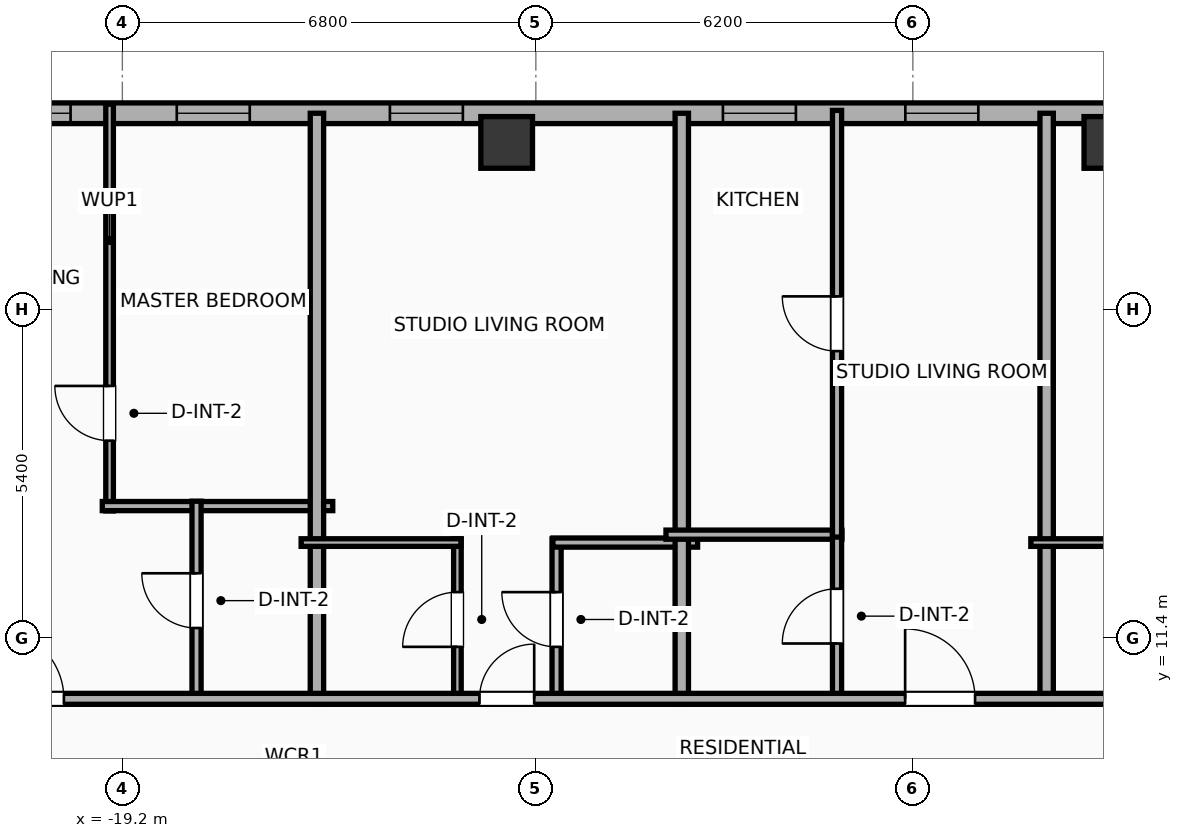
"""IFC4 building model, lengths in metres.
Left out: names, types, materials, properties, quantities, classifications, styles, units other than length and angle.
Written with IfcOpenShell. Run it as: python <this file> out.ifc"""

import sys

from ifc_helpers import new_model, si_unit, direction, frame, frame_2d, origin, origin_2d, place, context, subcontext, project, spatial, rectangle, hollow_rectangle, extrude, element, fill, save


model = new_model("IFC4")
c1 = context("Model", 3, precision=1e-05, world=origin(), true_north=direction((0.0, 1.0)))
c2 = subcontext(c1, "Body", "Model", "MODEL_VIEW")
j1 = project(units=[si_unit("LENGTHUNIT", "METRE"), si_unit("PLANEANGLEUNIT", "RADIAN")], contexts=[c1])
p1 = place(None, origin())
s1 = spatial("IfcSite", under=j1, at=p1, CompositionType="ELEMENT")
p2 = place(p1, origin())
s2 = spatial("IfcBuilding", under=s1, at=p2, CompositionType="ELEMENT")
p3 = place(p2, frame((0.0, 0.0, 208.0)))
s3 = spatial("IfcBuildingStorey", under=s2, at=p3, CompositionType="ELEMENT", Elevation=208.0)
for number, where, z_axis, x_axis in (
    (1, (-2.96, 19.55, 0.0), (0.0, 0.0, 1.0), (1.0, 0.0, 0.0)),
    (2, (-12.88, 19.55, 0.0), (0.0, 0.0, 1.0), (1.0, 0.0, 0.0)),
):
    element("IfcColumn", number, at=place(p3, frame(where, z_axis=z_axis, x_axis=x_axis)), inside=s3, PredefinedType="COLUMN", context=c2, shape_type="SweptSolid", body=[
        extrude(hollow_rectangle(XDim=0.85, YDim=0.85, WallThickness=0.028, at=origin_2d()), origin(), (0.0, 0.0, 1.0), 3.9),
    ])
p4 = place(p3, frame((-22.783, 20.03, 0.0), z_axis=(0.0, 0.0, 1.0), x_axis=(1.0, 0.0, 0.0)))
e3 = element("IfcWall", 3, at=p4, inside=s3, PredefinedType="ELEMENTEDWALL", context=c2, shape_type="SweptSolid", body=[
    extrude(rectangle(XDim=49.566, YDim=0.34, at=frame_2d((24.783, 0.0))), origin(), (0.0, 0.0, 1.0), 3.65),
])
p5 = place(p4, frame((25.233, 0.0, 0.75)))
e4 = element("IfcOpeningElement", 4, at=p5, cuts=e3, PredefinedType="OPENING", context=c2, shape_type="SweptSolid", body=[
    extrude(rectangle(XDim=2.4, YDim=2.1, at=frame_2d((1.2, 1.05))), frame((0.0, 0.18, 0.0), z_axis=(0.0, -1.0, 0.0), x_axis=(1.0, 0.0, 0.0)), (0.0, 0.0, 1.0), 0.36),
])
p6 = place(p4, frame((1.532, 0.0, 0.75)))
e5 = element("IfcOpeningElement", 5, at=p6, cuts=e3, PredefinedType="OPENING", context=c2, shape_type="SweptSolid", body=[
    extrude(rectangle(XDim=1.2, YDim=2.05, at=frame_2d((0.6, 1.025))), frame((0.0, 0.18, 0.0), z_axis=(0.0, -1.0, 0.0), x_axis=(1.0, 0.0, 0.0)), (0.0, 0.0, 1.0), 0.36),
])
p7 = place(p4, frame((4.478, 0.0, 0.75)))
e6 = element("IfcOpeningElement", 6, at=p7, cuts=e3, PredefinedType="OPENING", context=c2, shape_type="SweptSolid", body=[
    extrude(rectangle(XDim=1.2, YDim=2.05, at=frame_2d((0.6, 1.025))), frame((0.0, 0.18, 0.0), z_axis=(0.0, -1.0, 0.0), x_axis=(1.0, 0.0, 0.0)), (0.0, 0.0, 1.0), 0.36),
])
p8 = place(p4, frame((7.983, 0.0, 0.75)))
e7 = element("IfcOpeningElement", 7, at=p8, cuts=e3, PredefinedType="OPENING", context=c2, shape_type="SweptSolid", body=[
    extrude(rectangle(XDim=1.2, YDim=2.05, at=frame_2d((0.6, 1.025))), frame((0.0, 0.18, 0.0), z_axis=(0.0, -1.0, 0.0), x_axis=(1.0, 0.0, 0.0)), (0.0, 0.0, 1.0), 0.36),
])
p9 = place(p4, frame((16.46, 0.0, 0.75)))
e8 = element("IfcOpeningElement", 8, at=p9, cuts=e3, PredefinedType="OPENING", context=c2, shape_type="SweptSolid", body=[
    extrude(rectangle(XDim=1.2, YDim=2.05, at=frame_2d((0.6, 1.025))), frame((0.0, 0.18, 0.0), z_axis=(0.0, -1.0, 0.0), x_axis=(1.0, 0.0, 0.0)), (0.0, 0.0, 1.0), 0.36),
])
p10 = place(p4, frame((13.46, 0.0, 0.75)))
e9 = element("IfcOpeningElement", 9, at=p10, cuts=e3, PredefinedType="OPENING", context=c2, shape_type="SweptSolid", body=[
    extrude(rectangle(XDim=1.2, YDim=2.05, at=frame_2d((0.6, 1.025))), frame((0.0, 0.18, 0.0), z_axis=(0.0, -1.0, 0.0), x_axis=(1.0, 0.0, 0.0)), (0.0, 0.0, 1.0), 0.36),
])
p11 = place(p4, frame((21.183, 0.0, 0.75)))
e10 = element("IfcOpeningElement", 10, at=p11, cuts=e3, PredefinedType="OPENING", context=c2, shape_type="SweptSolid", body=[
    extrude(rectangle(XDim=1.2, YDim=2.05, at=frame_2d((0.6, 1.025))), frame((0.0, 0.18, 0.0), z_axis=(0.0, -1.0, 0.0), x_axis=(1.0, 0.0, 0.0)), (0.0, 0.0, 1.0), 0.36),
])
p12 = place(p4, frame((31.808, 0.0, 0.75)))
e11 = element("IfcOpeningElement", 11, at=p12, cuts=e3, PredefinedType="OPENING", context=c2, shape_type="SweptSolid", body=[
    extrude(rectangle(XDim=1.2, YDim=2.05, at=frame_2d((0.6, 1.025))), frame((0.0, 0.18, 0.0), z_axis=(0.0, -1.0, 0.0), x_axis=(1.0, 0.0, 0.0)), (0.0, 0.0, 1.0), 0.36),
])
p13 = place(p4, frame((34.558, 0.0, 0.75)))
e12 = element("IfcOpeningElement", 12, at=p13, cuts=e3, PredefinedType="OPENING", context=c2, shape_type="SweptSolid", body=[
    extrude(rectangle(XDim=1.2, YDim=2.05, at=frame_2d((0.6, 1.025))), frame((0.0, 0.18, 0.0), z_axis=(0.0, -1.0, 0.0), x_axis=(1.0, 0.0, 0.0)), (0.0, 0.0, 1.0), 0.36),
])
p14 = place(p4, frame((37.833, 0.0, 0.75)))
e13 = element("IfcOpeningElement", 13, at=p14, cuts=e3, PredefinedType="OPENING", context=c2, shape_type="SweptSolid", body=[
    extrude(rectangle(XDim=1.2, YDim=2.05, at=frame_2d((0.6, 1.025))), frame((0.0, 0.18, 0.0), z_axis=(0.0, -1.0, 0.0), x_axis=(1.0, 0.0, 0.0)), (0.0, 0.0, 1.0), 0.36),
])
p15 = place(p4, frame((42.797, 0.0, 0.75)))
e14 = element("IfcOpeningElement", 14, at=p15, cuts=e3, PredefinedType="OPENING", context=c2, shape_type="SweptSolid", body=[
    extrude(rectangle(XDim=1.2, YDim=2.05, at=frame_2d((0.6, 1.025))), frame((0.0, 0.18, 0.0), z_axis=(0.0, -1.0, 0.0), x_axis=(1.0, 0.0, 0.0)), (0.0, 0.0, 1.0), 0.36),
])
p16 = place(p4, frame((45.606, 0.0, 0.75)))
e15 = element("IfcOpeningElement", 15, at=p16, cuts=e3, PredefinedType="OPENING", context=c2, shape_type="SweptSolid", body=[
    extrude(rectangle(XDim=1.2, YDim=2.05, at=frame_2d((0.6, 1.025))), frame((0.0, 0.18, 0.0), z_axis=(0.0, -1.0, 0.0), x_axis=(1.0, 0.0, 0.0)), (0.0, 0.0, 1.0), 0.36),
])
p17 = place(p4, frame((47.679, 0.0, 0.75)))
e16 = element("IfcOpeningElement", 16, at=p17, cuts=e3, PredefinedType="OPENING", context=c2, shape_type="SweptSolid", body=[
    extrude(rectangle(XDim=1.2, YDim=2.05, at=frame_2d((0.6, 1.025))), frame((0.0, 0.18, 0.0), z_axis=(0.0, -1.0, 0.0), x_axis=(1.0, 0.0, 0.0)), (0.0, 0.0, 1.0), 0.36),
])
p18 = place(p3, frame((-19.41, 13.49, 0.0), z_axis=(0.0, 0.0, 1.0), x_axis=(0.0, 1.0, 0.0)))
e17 = element("IfcWall", 17, at=p18, inside=s3, PredefinedType="PARTITIONING", context=c2, shape_type="SweptSolid", body=[
    extrude(rectangle(XDim=6.69, YDim=0.125, at=frame_2d((3.345, 0.0))), origin(), (0.0, 0.0, 1.0), 3.65),
])
p19 = place(p18, frame((1.156, 0.0, 0.0)))
e18 = element("IfcOpeningElement", 18, at=p19, cuts=e17, PredefinedType="OPENING", context=c2, shape_type="SweptSolid", body=[
    extrude(rectangle(XDim=0.9, YDim=2.05, at=frame_2d((0.45, 1.025))), frame((0.0, 0.073, 0.0), z_axis=(0.0, -1.0, 0.0), x_axis=(1.0, 0.0, 0.0)), (0.0, 0.0, 1.0), 0.145),
])
p20 = place(p3, frame((-19.53, 13.57, 0.0), z_axis=(0.0, 0.0, 1.0), x_axis=(1.0, 0.0, 0.0)))
e19 = element("IfcWall", 19, at=p20, inside=s3, PredefinedType="PLUMBINGWALL", context=c2, shape_type="SweptSolid", body=[
    extrude(rectangle(XDim=3.79, YDim=0.15, at=frame_2d((1.895, 0.0))), origin(), (0.0, 0.0, 1.0), 3.65),
])
p21 = place(p3, frame((-17.98, 10.38, 0.0), z_axis=(0.0, 0.0, 1.0), x_axis=(0.0, 1.0, 0.0)))
e20 = element("IfcWall", 20, at=p21, inside=s3, PredefinedType="PLUMBINGWALL", context=c2, shape_type="SweptSolid", body=[
    extrude(rectangle(XDim=3.27, YDim=0.15, at=frame_2d((1.635, 0.0))), origin(), (0.0, 0.0, 1.0), 3.65),
])
p22 = place(p21, frame((1.185, 0.0, 0.0)))
e21 = element("IfcOpeningElement", 21, at=p22, cuts=e20, PredefinedType="OPENING", context=c2, shape_type="SweptSolid", body=[
    extrude(rectangle(XDim=0.9, YDim=2.05, at=frame_2d((0.45, 1.025))), frame((0.0, 0.085, 0.0), z_axis=(0.0, -1.0, 0.0), x_axis=(1.0, 0.0, 0.0)), (0.0, 0.0, 1.0), 0.17),
])
p23 = place(p3, frame((-16.0, 10.32, 0.0), z_axis=(0.0, 0.0, 1.0), x_axis=(0.0, 1.0, 0.0)))
e22 = element("IfcWall", 22, at=p23, inside=s3, PredefinedType="PARTITIONING", context=c2, shape_type="SweptSolid", body=[
    extrude(rectangle(XDim=9.71, YDim=0.22, at=frame_2d((4.855, 0.0))), origin(), (0.0, 0.0, 1.0), 3.65),
])
p24 = place(p3, frame((-13.69, 10.38, 0.0), z_axis=(0.0, 0.0, 1.0), x_axis=(0.0, 1.0, 0.0)))
e23 = element("IfcWall", 23, at=p24, inside=s3, PredefinedType="PARTITIONING", context=c2, shape_type="SweptSolid", body=[
    extrude(rectangle(XDim=2.65, YDim=0.125, at=frame_2d((1.325, 0.0))), origin(), (0.0, 0.0, 1.0), 3.65),
])
p25 = place(p24, frame((0.875, 0.0, 0.0)))
e24 = element("IfcOpeningElement", 24, at=p25, cuts=e23, PredefinedType="OPENING", context=c2, shape_type="SweptSolid", body=[
    extrude(rectangle(XDim=0.9, YDim=2.05, at=frame_2d((0.45, 1.025))), frame((0.0, 0.073, 0.0), z_axis=(0.0, -1.0, 0.0), x_axis=(1.0, 0.0, 0.0)), (0.0, 0.0, 1.0), 0.145),
])
p26 = place(p3, frame((-12.059, 10.38, 0.0), z_axis=(0.0, 0.0, 1.0), x_axis=(0.0, 1.0, 0.0)))
e25 = element("IfcWall", 25, at=p26, inside=s3, PredefinedType="PLUMBINGWALL", context=c2, shape_type="SweptSolid", body=[
    extrude(rectangle(XDim=2.65, YDim=0.15, at=frame_2d((1.325, 0.0))), origin(), (0.0, 0.0, 1.0), 3.65),
])
p27 = place(p26, frame((0.875, 0.0, 0.0)))
e26 = element("IfcOpeningElement", 26, at=p27, cuts=e25, PredefinedType="OPENING", context=c2, shape_type="SweptSolid", body=[
    extrude(rectangle(XDim=0.9, YDim=2.05, at=frame_2d((0.45, 1.025))), frame((0.0, 0.085, 0.0), z_axis=(0.0, -1.0, 0.0), x_axis=(1.0, 0.0, 0.0)), (0.0, 0.0, 1.0), 0.17),
])
p28 = place(p3, frame((-16.26, 12.97, 0.0), z_axis=(0.0, 0.0, 1.0), x_axis=(1.0, 0.0, 0.0)))
e27 = element("IfcWall", 27, at=p28, inside=s3, PredefinedType="PARTITIONING", context=c2, shape_type="SweptSolid", body=[
    extrude(rectangle(XDim=2.63, YDim=0.125, at=frame_2d((1.315, 0.0))), origin(), (0.0, 0.0, 1.0), 3.65),
])
p29 = place(p3, frame((-12.119, 12.97, 0.0), z_axis=(0.0, 0.0, 1.0), x_axis=(1.0, 0.0, 0.0)))
e28 = element("IfcWall", 28, at=p29, inside=s3, PredefinedType="PLUMBINGWALL", context=c2, shape_type="SweptSolid", body=[
    extrude(rectangle(XDim=2.379, YDim=0.15, at=frame_2d((1.189, 0.0))), origin(), (0.0, 0.0, 1.0), 3.65),
])
p30 = place(p3, frame((-10.0, 10.32, 0.0), z_axis=(0.0, 0.0, 1.0), x_axis=(0.0, 1.0, 0.0)))
e29 = element("IfcWall", 29, at=p30, inside=s3, PredefinedType="PARTITIONING", context=c2, shape_type="SweptSolid", body=[
    extrude(rectangle(XDim=9.71, YDim=0.22, at=frame_2d((4.855, 0.0))), origin(), (0.0, 0.0, 1.0), 3.65),
])
p31 = place(p3, frame((-10.26, 13.1, 0.0), z_axis=(0.0, 0.0, 1.0), x_axis=(1.0, 0.0, 0.0)))
e30 = element("IfcWall", 30, at=p31, inside=s3, PredefinedType="PLUMBINGWALL", context=c2, shape_type="SweptSolid", body=[
    extrude(rectangle(XDim=2.893, YDim=0.15, at=frame_2d((1.447, 0.0))), origin(), (0.0, 0.0, 1.0), 3.65),
])
p32 = place(p3, frame((-7.447, 10.38, 0.0), z_axis=(0.0, 0.0, 1.0), x_axis=(0.0, 1.0, 0.0)))
e31 = element("IfcWall", 31, at=p32, inside=s3, PredefinedType="PLUMBINGWALL", context=c2, shape_type="SweptSolid", body=[
    extrude(rectangle(XDim=2.76, YDim=0.15, at=frame_2d((1.38, 0.0))), origin(), (0.0, 0.0, 1.0), 3.65),
])
p33 = place(p32, frame((0.93, 0.0, 0.0)))
e32 = element("IfcOpeningElement", 32, at=p33, cuts=e31, PredefinedType="OPENING", context=c2, shape_type="SweptSolid", body=[
    extrude(rectangle(XDim=0.9, YDim=2.05, at=frame_2d((0.45, 1.025))), frame((0.0, 0.085, 0.0), z_axis=(0.0, -1.0, 0.0), x_axis=(1.0, 0.0, 0.0)), (0.0, 0.0, 1.0), 0.17),
])
p34 = place(p3, frame((-7.447, 13.06, 0.0), z_axis=(0.0, 0.0, 1.0), x_axis=(0.0, 1.0, 0.0)))
e33 = element("IfcWall", 33, at=p34, inside=s3, PredefinedType="PLUMBINGWALL", context=c2, shape_type="SweptSolid", body=[
    extrude(rectangle(XDim=7.017, YDim=0.15, at=frame_2d((3.508, 0.0))), origin(), (0.0, 0.0, 1.0), 3.65),
])
p35 = place(p34, frame((3.058, 0.0, 0.0)))
e34 = element("IfcOpeningElement", 34, at=p35, cuts=e33, PredefinedType="OPENING", context=c2, shape_type="SweptSolid", body=[
    extrude(rectangle(XDim=0.9, YDim=2.05, at=frame_2d((0.45, 1.025))), frame((0.0, 0.085, 0.0), z_axis=(0.0, -1.0, 0.0), x_axis=(1.0, 0.0, 0.0)), (0.0, 0.0, 1.0), 0.17),
])
p36 = place(p3, frame((-4.0, 10.32, 0.0), z_axis=(0.0, 0.0, 1.0), x_axis=(0.0, 1.0, 0.0)))
e35 = element("IfcWall", 35, at=p36, inside=s3, PredefinedType="PARTITIONING", context=c2, shape_type="SweptSolid", body=[
    extrude(rectangle(XDim=9.71, YDim=0.22, at=frame_2d((4.855, 0.0))), origin(), (0.0, 0.0, 1.0), 3.09),
])
p37 = place(p3, frame((-4.26, 12.97, 0.0), z_axis=(0.0, 0.0, 1.0), x_axis=(1.0, 0.0, 0.0)))
e36 = element("IfcWall", 36, at=p37, inside=s3, PredefinedType="PARTITIONING", context=c2, shape_type="SweptSolid", body=[
    extrude(rectangle(XDim=2.63, YDim=0.125, at=frame_2d((1.315, 0.0))), origin(), (0.0, 0.0, 1.0), 3.65),
])
p38 = place(p3, frame((-26.23, 10.4, 0.0), z_axis=(0.0, 0.0, 1.0), x_axis=(1.0, 0.0, 0.0)))
e37 = element("IfcWall", 37, at=p38, inside=s3, PredefinedType="PARTITIONING", context=c2, shape_type="SweptSolid", body=[
    extrude(rectangle(XDim=56.46, YDim=0.18, at=frame_2d((28.23, 0.0))), origin(), (0.0, 0.0, 1.0), 3.65),
])
p39 = place(p38, frame((4.919, 0.0, 0.0)))
e38 = element("IfcOpeningElement", 38, at=p39, cuts=e37, PredefinedType="OPENING", context=c2, shape_type="SweptSolid", body=[
    extrude(rectangle(XDim=1.15, YDim=2.05, at=frame_2d((0.575, 1.025))), frame((0.0, 0.1, 0.0), z_axis=(0.0, -1.0, 0.0), x_axis=(1.0, 0.0, 0.0)), (0.0, 0.0, 1.0), 0.2),
])
p40 = place(p38, frame((12.903, 0.0, 0.0)))
e39 = element("IfcOpeningElement", 39, at=p40, cuts=e37, PredefinedType="OPENING", context=c2, shape_type="SweptSolid", body=[
    extrude(rectangle(XDim=0.9, YDim=2.05, at=frame_2d((0.45, 1.025))), frame((0.0, 0.1, 0.0), z_axis=(0.0, -1.0, 0.0), x_axis=(1.0, 0.0, 0.0)), (0.0, 0.0, 1.0), 0.2),
])
p41 = place(p38, frame((19.903, 0.0, 0.0)))
e40 = element("IfcOpeningElement", 40, at=p41, cuts=e37, PredefinedType="OPENING", context=c2, shape_type="SweptSolid", body=[
    extrude(rectangle(XDim=1.15, YDim=2.05, at=frame_2d((0.575, 1.025))), frame((0.0, 0.1, 0.0), z_axis=(0.0, -1.0, 0.0), x_axis=(1.0, 0.0, 0.0)), (0.0, 0.0, 1.0), 0.2),
])
p42 = place(p38, frame((24.906, 0.0, 0.0)))
e41 = element("IfcOpeningElement", 41, at=p42, cuts=e37, PredefinedType="OPENING", context=c2, shape_type="SweptSolid", body=[
    extrude(rectangle(XDim=0.9, YDim=2.05, at=frame_2d((0.45, 1.025))), frame((0.0, 0.1, 0.0), z_axis=(0.0, -1.0, 0.0), x_axis=(1.0, 0.0, 0.0)), (0.0, 0.0, 1.0), 0.2),
])
p43 = place(p38, frame((30.908, 0.0, 0.0)))
e42 = element("IfcOpeningElement", 42, at=p43, cuts=e37, PredefinedType="OPENING", context=c2, shape_type="SweptSolid", body=[
    extrude(rectangle(XDim=0.9, YDim=2.05, at=frame_2d((0.45, 1.025))), frame((0.0, 0.1, 0.0), z_axis=(0.0, -1.0, 0.0), x_axis=(1.0, 0.0, 0.0)), (0.0, 0.0, 1.0), 0.2),
])
p44 = place(p38, frame((35.311, 0.0, 0.0)))
e43 = element("IfcOpeningElement", 43, at=p44, cuts=e37, PredefinedType="OPENING", context=c2, shape_type="SweptSolid", body=[
    extrude(rectangle(XDim=1.15, YDim=2.05, at=frame_2d((0.575, 1.025))), frame((0.0, 0.1, 0.0), z_axis=(0.0, -1.0, 0.0), x_axis=(1.0, 0.0, 0.0)), (0.0, 0.0, 1.0), 0.2),
])
p45 = place(p38, frame((42.24, 0.0, 0.0)))
e44 = element("IfcOpeningElement", 44, at=p45, cuts=e37, PredefinedType="OPENING", context=c2, shape_type="SweptSolid", body=[
    extrude(rectangle(XDim=0.9, YDim=2.05, at=frame_2d((0.45, 1.025))), frame((0.0, 0.1, 0.0), z_axis=(0.0, -1.0, 0.0), x_axis=(1.0, 0.0, 0.0)), (0.0, 0.0, 1.0), 0.2),
])
p46 = place(p38, frame((46.298, 0.0, 0.0)))
e45 = element("IfcOpeningElement", 45, at=p46, cuts=e37, PredefinedType="OPENING", context=c2, shape_type="SweptSolid", body=[
    extrude(rectangle(XDim=1.15, YDim=2.05, at=frame_2d((0.575, 1.025))), frame((0.0, 0.1, 0.0), z_axis=(0.0, -1.0, 0.0), x_axis=(1.0, 0.0, 0.0)), (0.0, 0.0, 1.0), 0.2),
])
p47 = place(p38, frame((53.418, 0.0, 0.0)))
e46 = element("IfcOpeningElement", 46, at=p47, cuts=e37, PredefinedType="OPENING", context=c2, shape_type="SweptSolid", body=[
    extrude(rectangle(XDim=0.9, YDim=2.05, at=frame_2d((0.45, 1.025))), frame((0.0, 0.1, 0.0), z_axis=(0.0, -1.0, 0.0), x_axis=(1.0, 0.0, 0.0)), (0.0, 0.0, 1.0), 0.2),
])
p48 = place(p6, origin())
e47 = element("IfcWindow", 47, at=p48, inside=s3, PartitioningType="SINGLE_PANEL", PredefinedType="WINDOW", context=c2, shape_type="SweptSolid", body=[
    extrude(rectangle(XDim=1.2, YDim=2.05, at=frame_2d((0.6, 1.025))), frame((0.0, 0.03, 0.0), z_axis=(0.0, -1.0, 0.0), x_axis=(1.0, 0.0, 0.0)), (0.0, 0.0, 1.0), 0.06),
])
fill(e5, e47)
p49 = place(p7, origin())
e48 = element("IfcWindow", 48, at=p49, inside=s3, PartitioningType="SINGLE_PANEL", PredefinedType="WINDOW", context=c2, shape_type="SweptSolid", body=[
    extrude(rectangle(XDim=1.2, YDim=2.05, at=frame_2d((0.6, 1.025))), frame((0.0, 0.03, 0.0), z_axis=(0.0, -1.0, 0.0), x_axis=(1.0, 0.0, 0.0)), (0.0, 0.0, 1.0), 0.06),
])
fill(e6, e48)
p50 = place(p8, origin())
e49 = element("IfcWindow", 49, at=p50, inside=s3, PartitioningType="SINGLE_PANEL", PredefinedType="WINDOW", context=c2, shape_type="SweptSolid", body=[
    extrude(rectangle(XDim=1.2, YDim=2.05, at=frame_2d((0.6, 1.025))), frame((0.0, 0.03, 0.0), z_axis=(0.0, -1.0, 0.0), x_axis=(1.0, 0.0, 0.0)), (0.0, 0.0, 1.0), 0.06),
])
fill(e7, e49)
p51 = place(p9, origin())
e50 = element("IfcWindow", 50, at=p51, inside=s3, PartitioningType="SINGLE_PANEL", PredefinedType="WINDOW", context=c2, shape_type="SweptSolid", body=[
    extrude(rectangle(XDim=1.2, YDim=2.05, at=frame_2d((0.6, 1.025))), frame((0.0, 0.03, 0.0), z_axis=(0.0, -1.0, 0.0), x_axis=(1.0, 0.0, 0.0)), (0.0, 0.0, 1.0), 0.06),
])
fill(e8, e50)
p52 = place(p10, origin())
e51 = element("IfcWindow", 51, at=p52, inside=s3, PartitioningType="SINGLE_PANEL", PredefinedType="WINDOW", context=c2, shape_type="SweptSolid", body=[
    extrude(rectangle(XDim=1.2, YDim=2.05, at=frame_2d((0.6, 1.025))), frame((0.0, 0.03, 0.0), z_axis=(0.0, -1.0, 0.0), x_axis=(1.0, 0.0, 0.0)), (0.0, 0.0, 1.0), 0.06),
])
fill(e9, e51)
p53 = place(p19, origin())
e52 = element("IfcDoor", 52, at=p53, inside=s3, OperationType="SINGLE_SWING_RIGHT", PredefinedType="DOOR", context=c2, shape_type="SweptSolid", body=[
    extrude(rectangle(XDim=0.9, YDim=2.05, at=frame_2d((0.45, 1.025))), frame((0.0, 0.025, 0.0), z_axis=(0.0, -1.0, 0.0), x_axis=(1.0, 0.0, 0.0)), (0.0, 0.0, 1.0), 0.05),
])
fill(e18, e52)
p54 = place(p22, origin())
e53 = element("IfcDoor", 53, at=p54, inside=s3, OperationType="SINGLE_SWING_RIGHT", PredefinedType="DOOR", context=c2, shape_type="SweptSolid", body=[
    extrude(rectangle(XDim=0.9, YDim=2.05, at=frame_2d((0.45, 1.025))), frame((0.0, 0.025, 0.0), z_axis=(0.0, -1.0, 0.0), x_axis=(1.0, 0.0, 0.0)), (0.0, 0.0, 1.0), 0.05),
])
fill(e21, e53)
p55 = place(p25, origin())
e54 = element("IfcDoor", 54, at=p55, inside=s3, OperationType="SINGLE_SWING_LEFT", PredefinedType="DOOR", context=c2, shape_type="SweptSolid", body=[
    extrude(rectangle(XDim=0.9, YDim=2.05, at=frame_2d((0.45, 1.025))), frame((0.0, 0.025, 0.0), z_axis=(0.0, -1.0, 0.0), x_axis=(1.0, 0.0, 0.0)), (0.0, 0.0, 1.0), 0.05),
])
fill(e24, e54)
p56 = place(p27, origin())
e55 = element("IfcDoor", 55, at=p56, inside=s3, OperationType="SINGLE_SWING_RIGHT", PredefinedType="DOOR", context=c2, shape_type="SweptSolid", body=[
    extrude(rectangle(XDim=0.9, YDim=2.05, at=frame_2d((0.45, 1.025))), frame((0.0, 0.025, 0.0), z_axis=(0.0, -1.0, 0.0), x_axis=(1.0, 0.0, 0.0)), (0.0, 0.0, 1.0), 0.05),
])
fill(e26, e55)
p57 = place(p33, origin())
e56 = element("IfcDoor", 56, at=p57, inside=s3, OperationType="SINGLE_SWING_LEFT", PredefinedType="DOOR", context=c2, shape_type="SweptSolid", body=[
    extrude(rectangle(XDim=0.9, YDim=2.05, at=frame_2d((0.45, 1.025))), frame((0.0, 0.025, 0.0), z_axis=(0.0, -1.0, 0.0), x_axis=(1.0, 0.0, 0.0)), (0.0, 0.0, 1.0), 0.05),
])
fill(e32, e56)
p58 = place(p35, origin())
e57 = element("IfcDoor", 57, at=p58, inside=s3, OperationType="SINGLE_SWING_RIGHT", PredefinedType="DOOR", context=c2, shape_type="SweptSolid", body=[
    extrude(rectangle(XDim=0.9, YDim=2.05, at=frame_2d((0.45, 1.025))), frame((0.0, 0.025, 0.0), z_axis=(0.0, -1.0, 0.0), x_axis=(1.0, 0.0, 0.0)), (0.0, 0.0, 1.0), 0.05),
])
fill(e34, e57)
p59 = place(p39, origin())
e58 = element("IfcDoor", 58, at=p59, inside=s3, OperationType="SINGLE_SWING_LEFT", PredefinedType="DOOR", context=c2, shape_type="SweptSolid", body=[
    extrude(rectangle(XDim=1.15, YDim=2.05, at=frame_2d((0.575, 1.025))), frame((0.0, 0.025, 0.0), z_axis=(0.0, -1.0, 0.0), x_axis=(1.0, 0.0, 0.0)), (0.0, 0.0, 1.0), 0.05),
])
fill(e38, e58)
p60 = place(p40, origin())
e59 = element("IfcDoor", 59, at=p60, inside=s3, OperationType="SINGLE_SWING_RIGHT", PredefinedType="DOOR", context=c2, shape_type="SweptSolid", body=[
    extrude(rectangle(XDim=0.9, YDim=2.05, at=frame_2d((0.45, 1.025))), frame((0.0, 0.025, 0.0), z_axis=(0.0, -1.0, 0.0), x_axis=(1.0, 0.0, 0.0)), (0.0, 0.0, 1.0), 0.05),
])
fill(e39, e59)
p61 = place(p41, origin())
e60 = element("IfcDoor", 60, at=p61, inside=s3, OperationType="SINGLE_SWING_LEFT", PredefinedType="DOOR", context=c2, shape_type="SweptSolid", body=[
    extrude(rectangle(XDim=1.15, YDim=2.05, at=frame_2d((0.575, 1.025))), frame((0.0, 0.025, 0.0), z_axis=(0.0, -1.0, 0.0), x_axis=(1.0, 0.0, 0.0)), (0.0, 0.0, 1.0), 0.05),
])
fill(e40, e60)
save(model, sys.argv[1])
